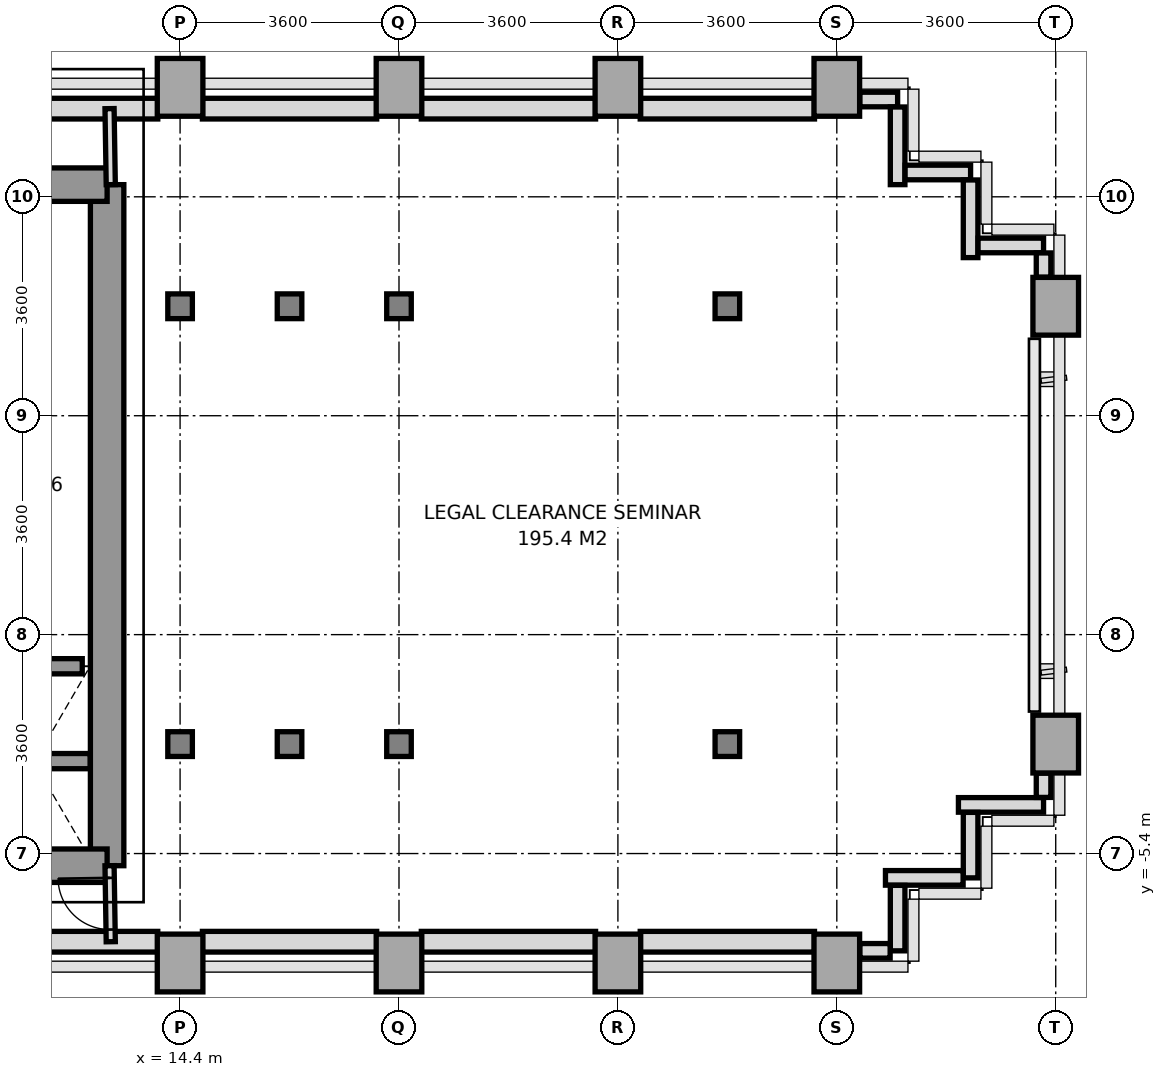
"""IFC4 building model, lengths in metres.
Left out: names, types, materials, properties, quantities, classifications, styles, units other than length and angle.
Written with IfcOpenShell. Run it as: python <this file> out.ifc"""

import sys

from ifc_helpers import new_model, si_unit, direction, frame, frame_2d, origin, origin_2d, place, context, subcontext, project, spatial, rectangle, i_section, extrude, source, transform, mapped, element, fill, save


model = new_model("IFC4")
c1 = context("Model", 3, precision=1e-05, world=origin(), true_north=direction((0.0, 1.0)))
c2 = subcontext(c1, "Body", "Model", "MODEL_VIEW")
j1 = project(units=[si_unit("LENGTHUNIT", "METRE"), si_unit("PLANEANGLEUNIT", "RADIAN")], contexts=[c1])
p1 = place(None, origin())
s1 = spatial("IfcSite", under=j1, at=p1, CompositionType="ELEMENT")
p2 = place(p1, origin())
s2 = spatial("IfcBuilding", under=s1, at=p2, CompositionType="ELEMENT")
p3 = place(p2, frame((0.0, 0.0, 64.6)))
s3 = spatial("IfcBuildingStorey", under=s2, at=p3, CompositionType="ELEMENT", Elevation=64.6)
m1 = source(origin(), c2, "Body", "SweptSolid", [
    extrude(rectangle(XDim=0.75, YDim=0.95, at=origin_2d()), origin(), (0.0, 0.0, 1.0), 3.2),
])
p4 = place(p3, frame((14.4, -7.2, 0.0), z_axis=(0.0, 0.0, 1.0), x_axis=(1.0, 0.0, 0.0)))
e1 = element("IfcColumn", 1, at=p4, inside=s3, PredefinedType="COLUMN", context=c2, shape_type="MappedRepresentation", body=[
    mapped(m1, transform((0.0, 0.0, 0.0), x_axis=(1.0, 0.0, 0.0), y_axis=(0.0, 1.0, 0.0), z_axis=(0.0, 0.0, 1.0), scale=1.0)),
])
m2 = source(origin(), c2, "Body", "SweptSolid", [
    extrude(i_section(OverallWidth=0.404, OverallDepth=0.407, WebThickness=0.022, FlangeThickness=0.035, at=origin_2d()), origin(), (0.0, 0.0, 1.0), 3.2),
])
for number, where, z_axis, x_axis in (
    (2, (14.4, -3.6, 0.0), (0.0, 0.0, 1.0), (1.0, 0.0, 0.0)),
    (3, (14.4, 3.6, 0.0), (0.0, 0.0, 1.0), (1.0, 0.0, 0.0)),
):
    element("IfcColumn", number, at=place(p3, frame(where, z_axis=z_axis, x_axis=x_axis)), inside=s3, PredefinedType="COLUMN", context=c2, shape_type="MappedRepresentation", body=[
        mapped(m2, transform((0.0, 0.0, 0.0), x_axis=(1.0, 0.0, 0.0), y_axis=(0.0, 1.0, 0.0), z_axis=(0.0, 0.0, 1.0), scale=1.0)),
    ])
p5 = place(p3, frame((14.4, 7.2, 0.0), z_axis=(0.0, 0.0, 1.0), x_axis=(1.0, 0.0, 0.0)))
e4 = element("IfcColumn", 4, at=p5, inside=s3, PredefinedType="COLUMN", context=c2, shape_type="MappedRepresentation", body=[
    mapped(m1, transform((0.0, 0.0, 0.0), x_axis=(1.0, 0.0, 0.0), y_axis=(0.0, 1.0, 0.0), z_axis=(0.0, 0.0, 1.0), scale=1.0)),
])
for number, where, z_axis, x_axis in (
    (5, (16.2, -3.6, 0.0), (0.0, 0.0, 1.0), (1.0, 0.0, 0.0)),
    (6, (16.2, 3.6, 0.0), (0.0, 0.0, 1.0), (1.0, 0.0, 0.0)),
):
    element("IfcColumn", number, at=place(p3, frame(where, z_axis=z_axis, x_axis=x_axis)), inside=s3, PredefinedType="COLUMN", context=c2, shape_type="MappedRepresentation", body=[
        mapped(m2, transform((0.0, 0.0, 0.0), x_axis=(1.0, 0.0, 0.0), y_axis=(0.0, 1.0, 0.0), z_axis=(0.0, 0.0, 1.0), scale=1.0)),
    ])
p6 = place(p3, frame((18.0, -7.2, 0.0), z_axis=(0.0, 0.0, 1.0), x_axis=(1.0, 0.0, 0.0)))
e7 = element("IfcColumn", 7, at=p6, inside=s3, PredefinedType="COLUMN", context=c2, shape_type="MappedRepresentation", body=[
    mapped(m1, transform((0.0, 0.0, 0.0), x_axis=(1.0, 0.0, 0.0), y_axis=(0.0, 1.0, 0.0), z_axis=(0.0, 0.0, 1.0), scale=1.0)),
])
for number, where, z_axis, x_axis in (
    (8, (18.0, -3.6, 0.0), (0.0, 0.0, 1.0), (1.0, 0.0, 0.0)),
    (9, (18.0, 3.6, 0.0), (0.0, 0.0, 1.0), (1.0, 0.0, 0.0)),
):
    element("IfcColumn", number, at=place(p3, frame(where, z_axis=z_axis, x_axis=x_axis)), inside=s3, PredefinedType="COLUMN", context=c2, shape_type="MappedRepresentation", body=[
        mapped(m2, transform((0.0, 0.0, 0.0), x_axis=(1.0, 0.0, 0.0), y_axis=(0.0, 1.0, 0.0), z_axis=(0.0, 0.0, 1.0), scale=1.0)),
    ])
for number, where, z_axis, x_axis in (
    (10, (18.0, 7.2, 0.0), (0.0, 0.0, 1.0), (1.0, 0.0, 0.0)),
    (11, (21.6, -7.2, 0.0), (0.0, 0.0, 1.0), (1.0, 0.0, 0.0)),
    (12, (21.6, 7.2, 0.0), (0.0, 0.0, 1.0), (1.0, 0.0, 0.0)),
):
    element("IfcColumn", number, at=place(p3, frame(where, z_axis=z_axis, x_axis=x_axis)), inside=s3, PredefinedType="COLUMN", context=c2, shape_type="MappedRepresentation", body=[
        mapped(m1, transform((0.0, 0.0, 0.0), x_axis=(1.0, 0.0, 0.0), y_axis=(0.0, 1.0, 0.0), z_axis=(0.0, 0.0, 1.0), scale=1.0)),
    ])
for number, where, z_axis, x_axis in (
    (13, (23.4, -3.6, 0.0), (0.0, 0.0, 1.0), (1.0, 0.0, 0.0)),
    (14, (23.4, 3.6, 0.0), (0.0, 0.0, 1.0), (1.0, 0.0, 0.0)),
):
    element("IfcColumn", number, at=place(p3, frame(where, z_axis=z_axis, x_axis=x_axis)), inside=s3, PredefinedType="COLUMN", context=c2, shape_type="MappedRepresentation", body=[
        mapped(m2, transform((0.0, 0.0, 0.0), x_axis=(1.0, 0.0, 0.0), y_axis=(0.0, 1.0, 0.0), z_axis=(0.0, 0.0, 1.0), scale=1.0)),
    ])
for number, where, z_axis, x_axis in (
    (15, (25.2, -7.2, 0.0), (0.0, 0.0, 1.0), (1.0, 0.0, 0.0)),
    (16, (25.2, 7.2, 0.0), (0.0, 0.0, 1.0), (1.0, 0.0, 0.0)),
    (17, (28.8, -3.6, 0.0), (0.0, 0.0, 1.0), (1.0, 0.0, 0.0)),
    (18, (28.8, 3.6, 0.0), (0.0, 0.0, 1.0), (1.0, 0.0, 0.0)),
):
    element("IfcColumn", number, at=place(p3, frame(where, z_axis=z_axis, x_axis=x_axis)), inside=s3, PredefinedType="COLUMN", context=c2, shape_type="MappedRepresentation", body=[
        mapped(m1, transform((0.0, 0.0, 0.0), x_axis=(1.0, 0.0, 0.0), y_axis=(0.0, 1.0, 0.0), z_axis=(0.0, 0.0, 1.0), scale=1.0)),
    ])
p7 = place(p3, frame((11.498, 6.85, 0.0), z_axis=(0.0, 0.0, 1.0), x_axis=(1.0, 0.0, 0.0)))
e19 = element("IfcWall", 19, at=p7, inside=s3, PredefinedType="SOLIDWALL", context=c2, shape_type="SweptSolid", body=[
    extrude(rectangle(XDim=2.535, YDim=0.34, at=frame_2d((1.268, 0.0))), origin(), (0.0, 0.0, 1.0), 3.2),
])
for number, where, z_axis, x_axis in (
    (20, (14.767, 6.85, 0.0), (0.0, 0.0, 1.0), (1.0, 0.0, 0.0)),
    (21, (18.367, 6.85, 0.0), (0.0, 0.0, 1.0), (1.0, 0.0, 0.0)),
    (22, (21.967, 6.85, 0.0), (0.0, 0.0, 1.0), (1.0, 0.0, 0.0)),
):
    element("IfcWall", number, at=place(p3, frame(where, z_axis=z_axis, x_axis=x_axis)), inside=s3, PredefinedType="SOLIDWALL", context=c2, shape_type="SweptSolid", body=[
        extrude(rectangle(XDim=2.866, YDim=0.34, at=frame_2d((1.433, 0.0))), origin(), (0.0, 0.0, 1.0), 2.45),
    ])
p8 = place(p3, frame((11.75, -6.85, 0.0), z_axis=(0.0, 0.0, 1.0), x_axis=(1.0, 0.0, 0.0)))
e23 = element("IfcWall", 23, at=p8, inside=s3, PredefinedType="SOLIDWALL", context=c2, shape_type="SweptSolid", body=[
    extrude(rectangle(XDim=2.283, YDim=0.34, at=frame_2d((1.142, 0.0))), origin(), (0.0, 0.0, 1.0), 3.2),
])
for number, where, z_axis, x_axis in (
    (24, (14.767, -6.85, 0.0), (0.0, 0.0, 1.0), (1.0, 0.0, 0.0)),
    (25, (18.367, -6.85, 0.0), (0.0, 0.0, 1.0), (1.0, 0.0, 0.0)),
    (26, (21.967, -6.85, 0.0), (0.0, 0.0, 1.0), (1.0, 0.0, 0.0)),
):
    element("IfcWall", number, at=place(p3, frame(where, z_axis=z_axis, x_axis=x_axis)), inside=s3, PredefinedType="SOLIDWALL", context=c2, shape_type="SweptSolid", body=[
        extrude(rectangle(XDim=2.866, YDim=0.34, at=frame_2d((1.433, 0.0))), origin(), (0.0, 0.0, 1.0), 2.45),
    ])
p9 = place(p3, frame((28.6, -4.6, 0.0), z_axis=(0.0, 0.0, 1.0), x_axis=(-1.0, 0.0, 0.0)))
e27 = element("IfcWall", 27, at=p9, inside=s3, PredefinedType="PARAPET", context=c2, shape_type="SweptSolid", body=[
    extrude(rectangle(XDim=1.4, YDim=0.24, at=frame_2d((0.7, 0.0))), origin(), (0.0, 0.0, 1.0), 1.15),
])
p10 = place(p3, frame((27.4, -4.723, 0.0), z_axis=(0.0, 0.0, 1.0), x_axis=(0.0, -1.0, 0.0)))
e28 = element("IfcWall", 28, at=p10, inside=s3, PredefinedType="PARAPET", context=c2, shape_type="SweptSolid", body=[
    extrude(rectangle(XDim=1.077, YDim=0.24, at=frame_2d((0.539, 0.0))), origin(), (0.0, 0.0, 1.0), 1.15),
])
p11 = place(p3, frame((27.277, -5.8, 0.0), z_axis=(0.0, 0.0, 1.0), x_axis=(-1.0, 0.0, 0.0)))
e29 = element("IfcWall", 29, at=p11, inside=s3, PredefinedType="PARAPET", context=c2, shape_type="SweptSolid", body=[
    extrude(rectangle(XDim=1.277, YDim=0.24, at=frame_2d((0.639, 0.0))), origin(), (0.0, 0.0, 1.0), 1.15),
])
p12 = place(p3, frame((26.2, -5.923, 0.0), z_axis=(0.0, 0.0, 1.0), x_axis=(0.0, -1.0, 0.0)))
e30 = element("IfcWall", 30, at=p12, inside=s3, PredefinedType="PARAPET", context=c2, shape_type="SweptSolid", body=[
    extrude(rectangle(XDim=1.077, YDim=0.24, at=frame_2d((0.539, 0.0))), origin(), (0.0, 0.0, 1.0), 1.15),
])
p13 = place(p3, frame((26.077, -7.0, 0.0), z_axis=(0.0, 0.0, 1.0), x_axis=(-1.0, 0.0, 0.0)))
e31 = element("IfcWall", 31, at=p13, inside=s3, PredefinedType="PARAPET", context=c2, shape_type="SweptSolid", body=[
    extrude(rectangle(XDim=0.499, YDim=0.24, at=frame_2d((0.25, 0.0))), origin(), (0.0, 0.0, 1.0), 1.15),
])
p14 = place(p3, frame((25.578, 7.0, 0.0), z_axis=(0.0, 0.0, 1.0), x_axis=(1.0, 0.0, 0.0)))
e32 = element("IfcWall", 32, at=p14, inside=s3, PredefinedType="PARAPET", context=c2, shape_type="SweptSolid", body=[
    extrude(rectangle(XDim=0.622, YDim=0.24, at=frame_2d((0.311, 0.0))), origin(), (0.0, 0.0, 1.0), 1.15),
])
p15 = place(p3, frame((26.2, 6.877, 0.0), z_axis=(0.0, 0.0, 1.0), x_axis=(0.0, -1.0, 0.0)))
e33 = element("IfcWall", 33, at=p15, inside=s3, PredefinedType="PARAPET", context=c2, shape_type="SweptSolid", body=[
    extrude(rectangle(XDim=1.277, YDim=0.24, at=frame_2d((0.638, 0.0))), origin(), (0.0, 0.0, 1.0), 1.15),
])
p16 = place(p3, frame((26.323, 5.8, 0.0), z_axis=(0.0, 0.0, 1.0), x_axis=(1.0, 0.0, 0.0)))
e34 = element("IfcWall", 34, at=p16, inside=s3, PredefinedType="PARAPET", context=c2, shape_type="SweptSolid", body=[
    extrude(rectangle(XDim=1.077, YDim=0.24, at=frame_2d((0.539, 0.0))), origin(), (0.0, 0.0, 1.0), 1.15),
])
p17 = place(p3, frame((27.4, 5.677, 0.0), z_axis=(0.0, 0.0, 1.0), x_axis=(0.0, -1.0, 0.0)))
e35 = element("IfcWall", 35, at=p17, inside=s3, PredefinedType="PARAPET", context=c2, shape_type="SweptSolid", body=[
    extrude(rectangle(XDim=1.277, YDim=0.24, at=frame_2d((0.639, 0.0))), origin(), (0.0, 0.0, 1.0), 1.15),
])
p18 = place(p3, frame((27.523, 4.6, 0.0), z_axis=(0.0, 0.0, 1.0), x_axis=(1.0, 0.0, 0.0)))
e36 = element("IfcWall", 36, at=p18, inside=s3, PredefinedType="PARAPET", context=c2, shape_type="SweptSolid", body=[
    extrude(rectangle(XDim=1.077, YDim=0.24, at=frame_2d((0.539, 0.0))), origin(), (0.0, 0.0, 1.0), 1.15),
])
for number, where, z_axis, x_axis in (
    (37, (28.6, 4.477, 0.0), (0.0, 0.0, 1.0), (0.0, -1.0, 0.0)),
    (38, (28.6, -4.078, 0.0), (0.0, 0.0, 1.0), (0.0, -1.0, 0.0)),
):
    element("IfcWall", number, at=place(p3, frame(where, z_axis=z_axis, x_axis=x_axis)), inside=s3, PredefinedType="PARAPET", context=c2, shape_type="SweptSolid", body=[
        extrude(rectangle(XDim=0.399, YDim=0.24, at=frame_2d((0.2, 0.0))), origin(), (0.0, 0.0, 1.0), 1.15),
    ])
p19 = place(p3, frame((13.2, -5.6, 0.0), z_axis=(0.0, 0.0, 1.0), x_axis=(0.0, 1.0, 0.0)))
e39 = element("IfcWall", 39, at=p19, inside=s3, PredefinedType="SHEAR", context=c2, shape_type="SweptSolid", body=[
    extrude(rectangle(XDim=11.2, YDim=0.55, at=frame_2d((5.6, 0.0))), origin(), (0.0, 0.0, 1.0), 3.2),
])
p20 = place(p3, frame((11.381, 5.6, 0.0), z_axis=(0.0, 0.0, 1.0), x_axis=(1.0, 0.0, 0.0)))
e40 = element("IfcWall", 40, at=p20, inside=s3, PredefinedType="SHEAR", context=c2, shape_type="SweptSolid", body=[
    extrude(rectangle(XDim=1.819, YDim=0.55, at=frame_2d((0.909, 0.0))), origin(), (0.0, 0.0, 1.0), 3.2),
])
p21 = place(p3, frame((5.4, -5.6, 0.0), z_axis=(0.0, 0.0, 1.0), x_axis=(1.0, 0.0, 0.0)))
e41 = element("IfcWall", 41, at=p21, inside=s3, PredefinedType="SHEAR", context=c2, shape_type="SweptSolid", body=[
    extrude(rectangle(XDim=7.8, YDim=0.55, at=frame_2d((3.9, 0.0))), origin(), (0.0, 0.0, 1.0), 3.2),
])
p22 = place(p21, frame((3.0, 0.0, 0.0)))
e42 = element("IfcOpeningElement", 42, at=p22, cuts=e41, PredefinedType="OPENING", context=c2, shape_type="SweptSolid", body=[
    extrude(rectangle(XDim=1.2, YDim=2.2, at=frame_2d((0.6, 1.1))), frame((0.0, 0.285, 0.0), z_axis=(0.0, -1.0, 0.0), x_axis=(1.0, 0.0, 0.0)), (0.0, 0.0, 1.0), 0.57),
])
p23 = place(p3, frame((11.08, -3.88, 0.0), z_axis=(0.0, 0.0, 1.0), x_axis=(1.0, 0.0, 0.0)))
e43 = element("IfcWall", 43, at=p23, inside=s3, PredefinedType="SOLIDWALL", context=c2, shape_type="SweptSolid", body=[
    extrude(rectangle(XDim=1.84, YDim=0.25, at=frame_2d((0.92, 0.0))), origin(), (0.0, 0.0, 1.0), 3.2),
])
p24 = place(p3, frame((11.209, -2.32, 0.0), z_axis=(0.0, 0.0, 1.0), x_axis=(1.0, 0.0, 0.0)))
e44 = element("IfcWall", 44, at=p24, inside=s3, PredefinedType="SOLIDWALL", context=c2, shape_type="SweptSolid", body=[
    extrude(rectangle(XDim=1.582, YDim=0.25, at=frame_2d((0.791, 0.0))), origin(), (0.0, 0.0, 1.0), 3.2),
])
p25 = place(p3, frame((13.26, 5.6, 0.0), z_axis=(0.0, 0.0, 1.0), x_axis=(-0.016013571389, 0.999871774545, 0.0)))
e45 = element("IfcWall", 45, at=p25, inside=s3, PredefinedType="PARTITIONING", context=c2, shape_type="SweptSolid", body=[
    extrude(rectangle(XDim=1.25, YDim=0.15, at=frame_2d((0.625, 0.0))), origin(), (0.0, 0.0, 1.0), 3.2),
])
p26 = place(p3, frame((13.26, -6.85, 0.0), z_axis=(0.0, 0.0, 1.0), x_axis=(-0.016013571389, 0.999871774545, 0.0)))
e46 = element("IfcWall", 46, at=p26, inside=s3, PredefinedType="PARTITIONING", context=c2, shape_type="SweptSolid", body=[
    extrude(rectangle(XDim=1.25, YDim=0.15, at=frame_2d((0.625, 0.0))), origin(), (0.0, 0.0, 1.0), 3.2),
])
p27 = place(p26, frame((0.2, 0.0, 0.0)))
e47 = element("IfcOpeningElement", 47, at=p27, cuts=e46, PredefinedType="OPENING", context=c2, shape_type="SweptSolid", body=[
    extrude(rectangle(XDim=0.85, YDim=2.1, at=frame_2d((0.425, 1.05))), frame((0.0, 0.085, 0.0), z_axis=(0.0, -1.0, 0.0), x_axis=(1.0, 0.0, 0.0)), (0.0, 0.0, 1.0), 0.17),
])
m3 = source(origin(), c2, "Body", "SweptSolid", [
    extrude(rectangle(XDim=0.85, YDim=2.1, at=frame_2d((0.425, 1.05))), frame((0.0, 0.025, 0.0), z_axis=(0.0, -1.0, 0.0), x_axis=(1.0, 0.0, 0.0)), (0.0, 0.0, 1.0), 0.05),
])
p28 = place(p27, origin())
e48 = element("IfcDoor", 48, at=p28, inside=s3, OperationType="SINGLE_SWING_RIGHT", PredefinedType="DOOR", context=c2, shape_type="MappedRepresentation", body=[
    mapped(m3, transform((0.0, 0.0, 0.0), x_axis=(1.0, 0.0, 0.0), y_axis=(0.0, 1.0, 0.0), z_axis=(0.0, 0.0, 1.0), scale=1.0)),
])
fill(e47, e48)
save(model, sys.argv[1])
